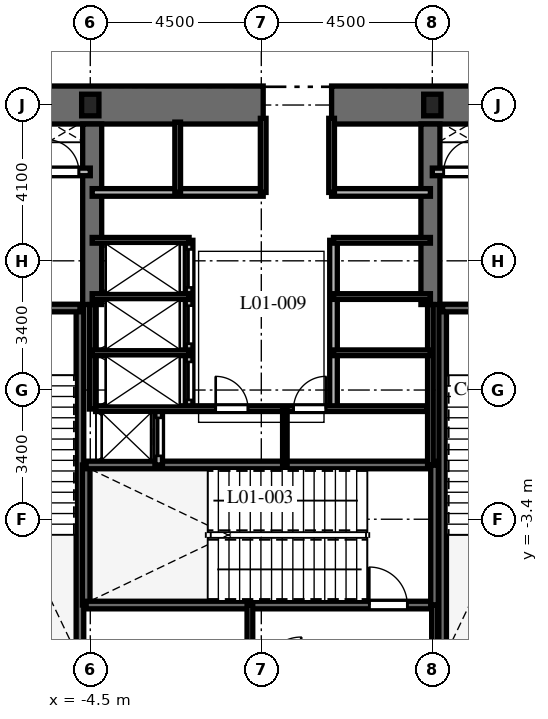
"""IFC4 building model, lengths in metres.
Left out: names, types, materials, properties, quantities, classifications, styles, units other than length and angle.
Written with IfcOpenShell. Run it as: python <this file> out.ifc"""

import sys

from ifc_helpers import new_model, si_unit, direction, frame, frame_2d, origin, origin_2d, place, context, subcontext, project, spatial, rectangle, i_section, extrude, element, fill, save


model = new_model("IFC4")
c1 = context("Model", 3, precision=1e-05, world=origin(), true_north=direction((0.0, 1.0)))
c2 = subcontext(c1, "Body", "Model", "MODEL_VIEW")
j1 = project(units=[si_unit("LENGTHUNIT", "METRE"), si_unit("PLANEANGLEUNIT", "RADIAN")], contexts=[c1])
p1 = place(None, origin())
s1 = spatial("IfcSite", under=j1, at=p1, CompositionType="ELEMENT")
p2 = place(p1, origin())
s2 = spatial("IfcBuilding", under=s1, at=p2, CompositionType="ELEMENT")
p3 = place(p2, frame((0.0, 0.0, 6.0)))
s3 = spatial("IfcBuildingStorey", under=s2, at=p3, CompositionType="ELEMENT", Elevation=6.0)
p4 = place(p3, frame((-9.5, 7.5, 0.0), z_axis=(0.0, 0.0, 1.0), x_axis=(1.0, 0.0, 0.0)))
e1 = element("IfcWall", 1, at=p4, inside=s3, PredefinedType="SHEAR", context=c2, shape_type="SweptSolid", body=[
    extrude(rectangle(XDim=9.55, YDim=1.0, at=frame_2d((4.775, 0.0))), origin(), (0.0, 0.0, 1.0), 5.4),
])
p5 = place(p3, frame((1.85, 7.5, 0.0), z_axis=(0.0, 0.0, 1.0), x_axis=(1.0, 0.0, 0.0)))
e2 = element("IfcWall", 2, at=p5, inside=s3, PredefinedType="SHEAR", context=c2, shape_type="SweptSolid", body=[
    extrude(rectangle(XDim=7.65, YDim=1.0, at=frame_2d((3.825, 0.0))), origin(), (0.0, 0.0, 1.0), 5.4),
])
for number, where, z_axis, x_axis in (
    (3, (-4.45, 2.25, 0.0), (0.0, 0.0, 1.0), (0.0, 1.0, 0.0)),
    (4, (4.45, 2.25, 0.0), (0.0, 0.0, 1.0), (0.0, 1.0, 0.0)),
):
    element("IfcWall", number, at=place(p3, frame(where, z_axis=z_axis, x_axis=x_axis)), inside=s3, PredefinedType="SHEAR", context=c2, shape_type="SweptSolid", body=[
        extrude(rectangle(XDim=4.75, YDim=0.5, at=frame_2d((2.375, 0.0))), origin(), (0.0, 0.0, 1.0), 5.4),
    ])
p6 = place(p3, frame((-4.772, -6.985, 0.0), z_axis=(0.0, 0.0, 1.0), x_axis=(0.0, 1.0, 0.0)))
e5 = element("IfcWall", 5, at=p6, inside=s3, PredefinedType="SHEAR", context=c2, shape_type="SweptSolid", body=[
    extrude(rectangle(XDim=9.143, YDim=0.2, at=frame_2d((4.572, 0.0))), origin(), (0.0, 0.0, 1.0), 5.4),
])
p7 = place(p3, frame((-8.458, 2.158, 0.0), z_axis=(0.0, 0.0, 1.0), x_axis=(1.0, 0.0, 0.0)))
e6 = element("IfcWall", 6, at=p7, inside=s3, PredefinedType="SHEAR", context=c2, shape_type="SweptSolid", body=[
    extrude(rectangle(XDim=3.686, YDim=0.2, at=frame_2d((1.843, 0.0))), origin(), (0.0, 0.0, 1.0), 5.4),
])
p8 = place(p7, frame((1.3, 0.0, 0.0)))
e7 = element("IfcOpeningElement", 7, at=p8, cuts=e6, PredefinedType="OPENING", context=c2, shape_type="SweptSolid", body=[
    extrude(rectangle(XDim=1.0, YDim=2.15, at=frame_2d((0.5, 1.075))), frame((0.0, 0.11, 0.0), z_axis=(0.0, -1.0, 0.0), x_axis=(1.0, 0.0, 0.0)), (0.0, 0.0, 1.0), 0.22),
])
p9 = place(p3, frame((4.772, -6.985, 0.0), z_axis=(0.0, 0.0, 1.0), x_axis=(0.0, 1.0, 0.0)))
e8 = element("IfcWall", 8, at=p9, inside=s3, PredefinedType="SHEAR", context=c2, shape_type="SweptSolid", body=[
    extrude(rectangle(XDim=9.143, YDim=0.2, at=frame_2d((4.572, 0.0))), origin(), (0.0, 0.0, 1.0), 5.4),
])
p10 = place(p3, frame((4.772, 2.158, 0.0), z_axis=(0.0, 0.0, 1.0), x_axis=(1.0, 0.0, 0.0)))
e9 = element("IfcWall", 9, at=p10, inside=s3, PredefinedType="SHEAR", context=c2, shape_type="SweptSolid", body=[
    extrude(rectangle(XDim=3.686, YDim=0.2, at=frame_2d((1.843, 0.0))), origin(), (0.0, 0.0, 1.0), 5.4),
])
p11 = place(p10, frame((1.35, 0.0, 0.0)))
e10 = element("IfcOpeningElement", 10, at=p11, cuts=e9, PredefinedType="OPENING", context=c2, shape_type="SweptSolid", body=[
    extrude(rectangle(XDim=1.0, YDim=2.15, at=frame_2d((0.5, 1.075))), frame((0.0, 0.11, 0.0), z_axis=(0.0, -1.0, 0.0), x_axis=(1.0, 0.0, 0.0)), (0.0, 0.0, 1.0), 0.22),
])
p12 = place(p3, frame((-4.608, -5.658, 0.0), z_axis=(0.0, 0.0, 1.0), x_axis=(0.0, 1.0, 0.0)))
e11 = element("IfcWall", 11, at=p12, inside=s3, PredefinedType="SHEAR", context=c2, shape_type="SweptSolid", body=[
    extrude(rectangle(XDim=3.686, YDim=0.2, at=frame_2d((1.843, 0.0))), origin(), (0.0, 0.0, 1.0), 5.4),
])
p13 = place(p3, frame((-4.608, -5.658, 0.0), z_axis=(0.0, 0.0, 1.0), x_axis=(1.0, 0.0, 0.0)))
e12 = element("IfcWall", 12, at=p13, inside=s3, PredefinedType="SHEAR", context=c2, shape_type="SweptSolid", body=[
    extrude(rectangle(XDim=9.166, YDim=0.2, at=frame_2d((4.583, 0.0))), origin(), (0.0, 0.0, 1.0), 5.4),
])
p14 = place(p13, frame((7.45, 0.0, 0.0)))
e13 = element("IfcOpeningElement", 13, at=p14, cuts=e12, PredefinedType="OPENING", context=c2, shape_type="SweptSolid", body=[
    extrude(rectangle(XDim=1.0, YDim=2.15, at=frame_2d((0.5, 1.075))), frame((0.0, 0.11, 0.0), z_axis=(0.0, -1.0, 0.0), x_axis=(1.0, 0.0, 0.0)), (0.0, 0.0, 1.0), 0.22),
])
p15 = place(p3, frame((-4.608, -1.972, 0.0), z_axis=(0.0, 0.0, 1.0), x_axis=(1.0, 0.0, 0.0)))
e14 = element("IfcWall", 14, at=p15, inside=s3, PredefinedType="SHEAR", context=c2, shape_type="SweptSolid", body=[
    extrude(rectangle(XDim=9.166, YDim=0.2, at=frame_2d((4.583, 0.0))), origin(), (0.0, 0.0, 1.0), 5.4),
])
p16 = place(p3, frame((4.558, -5.658, 0.0), z_axis=(0.0, 0.0, 1.0), x_axis=(0.0, 1.0, 0.0)))
e15 = element("IfcWall", 15, at=p16, inside=s3, PredefinedType="SHEAR", context=c2, shape_type="SweptSolid", body=[
    extrude(rectangle(XDim=3.686, YDim=0.2, at=frame_2d((1.843, 0.0))), origin(), (0.0, 0.0, 1.0), 5.4),
])
for number, where, z_axis, x_axis in (
    (16, (4.5, 7.5, 0.0), (0.0, 0.0, 1.0), (1.0, 0.0, 0.0)),
    (17, (-4.5, 7.5, 0.0), (0.0, 0.0, 1.0), (1.0, 0.0, 0.0)),
):
    element("IfcColumn", number, at=place(p3, frame(where, z_axis=z_axis, x_axis=x_axis)), inside=s3, PredefinedType="COLUMN", context=c2, shape_type="SweptSolid", body=[
        extrude(i_section(OverallWidth=0.454, OverallDepth=0.569, WebThickness=0.078, FlangeThickness=0.125, at=origin_2d()), origin(), (0.0, 0.0, 1.0), 5.4),
    ])
for number, where, z_axis, x_axis in (
    (18, (-0.3, -7.02, 0.0), (0.0, 0.0, 1.0), (0.0, 1.0, 0.0)),
    (19, (4.558, -7.02, 0.0), (0.0, 0.0, 1.0), (0.0, 1.0, 0.0)),
):
    element("IfcWall", number, at=place(p3, frame(where, z_axis=z_axis, x_axis=x_axis)), inside=s3, PredefinedType="PARTITIONING", context=c2, shape_type="SweptSolid", body=[
        extrude(rectangle(XDim=1.362, YDim=0.15, at=frame_2d((0.681, 0.0))), origin(), (0.0, 0.0, 1.0), 5.08),
    ])
p17 = place(p3, frame((-8.55, 5.74, 0.0), z_axis=(0.0, 0.0, 1.0), x_axis=(1.0, 0.0, 0.0)))
e20 = element("IfcWall", 20, at=p17, inside=s3, PredefinedType="PARTITIONING", context=c2, shape_type="SweptSolid", body=[
    extrude(rectangle(XDim=4.05, YDim=0.2, at=frame_2d((2.025, 0.0))), origin(), (0.0, 0.0, 1.0), 5.08),
])
p18 = place(p17, frame((0.75, 0.0, 0.0)))
e21 = element("IfcOpeningElement", 21, at=p18, cuts=e20, PredefinedType="OPENING", context=c2, shape_type="SweptSolid", body=[
    extrude(rectangle(XDim=1.1, YDim=2.2, at=frame_2d((0.55, 1.1))), frame((0.0, 0.11, 0.0), z_axis=(0.0, -1.0, 0.0), x_axis=(1.0, 0.0, 0.0)), (0.0, 0.0, 1.0), 0.22),
])
p19 = place(p17, frame((2.9, 0.0, 0.0)))
e22 = element("IfcOpeningElement", 22, at=p19, cuts=e20, PredefinedType="OPENING", context=c2, shape_type="SweptSolid", body=[
    extrude(rectangle(XDim=0.85, YDim=2.03, at=frame_2d((0.425, 1.015))), frame((0.0, 0.11, 0.0), z_axis=(0.0, -1.0, 0.0), x_axis=(1.0, 0.0, 0.0)), (0.0, 0.0, 1.0), 0.22),
])
p20 = place(p3, frame((4.5, 5.74, 0.0), z_axis=(0.0, 0.0, 1.0), x_axis=(1.0, 0.0, 0.0)))
e23 = element("IfcWall", 23, at=p20, inside=s3, PredefinedType="PARTITIONING", context=c2, shape_type="SweptSolid", body=[
    extrude(rectangle(XDim=4.05, YDim=0.2, at=frame_2d((2.025, 0.0))), origin(), (0.0, 0.0, 1.0), 5.08),
])
p21 = place(p20, frame((0.3, 0.0, 0.0)))
e24 = element("IfcOpeningElement", 24, at=p21, cuts=e23, PredefinedType="OPENING", context=c2, shape_type="SweptSolid", body=[
    extrude(rectangle(XDim=0.85, YDim=2.03, at=frame_2d((0.425, 1.015))), frame((0.0, 0.11, 0.0), z_axis=(0.0, -1.0, 0.0), x_axis=(1.0, 0.0, 0.0)), (0.0, 0.0, 1.0), 0.22),
])
p22 = place(p20, frame((2.15, 0.0, 0.0)))
e25 = element("IfcOpeningElement", 25, at=p22, cuts=e23, PredefinedType="OPENING", context=c2, shape_type="SweptSolid", body=[
    extrude(rectangle(XDim=1.1, YDim=2.2, at=frame_2d((0.55, 1.1))), frame((0.0, 0.11, 0.0), z_axis=(0.0, -1.0, 0.0), x_axis=(1.0, 0.0, 0.0)), (0.0, 0.0, 1.0), 0.22),
])
p23 = place(p3, frame((-2.7, -1.972, 0.0), z_axis=(0.0, 0.0, 1.0), x_axis=(0.0, 1.0, 0.0)))
e26 = element("IfcWall", 26, at=p23, inside=s3, PredefinedType="PARTITIONING", context=c2, shape_type="SweptSolid", body=[
    extrude(rectangle(XDim=1.472, YDim=0.2, at=frame_2d((0.736, 0.0))), origin(), (0.0, 0.0, 1.0), 5.08),
])
p24 = place(p23, frame((0.24, 0.0, 0.0)))
e27 = element("IfcOpeningElement", 27, at=p24, cuts=e26, PredefinedType="OPENING", context=c2, shape_type="SweptSolid", body=[
    extrude(rectangle(XDim=1.0, YDim=2.2, at=frame_2d((0.5, 1.1))), frame((0.0, 0.11, 0.0), z_axis=(0.0, -1.0, 0.0), x_axis=(1.0, 0.0, 0.0)), (0.0, 0.0, 1.0), 0.22),
])
p25 = place(p3, frame((-4.45, 5.2, 0.0), z_axis=(0.0, 0.0, 1.0), x_axis=(1.0, 0.0, 0.0)))
e28 = element("IfcWall", 28, at=p25, inside=s3, PredefinedType="PARTITIONING", context=c2, shape_type="SweptSolid", body=[
    extrude(rectangle(XDim=4.5, YDim=0.2, at=frame_2d((2.25, 0.0))), origin(), (0.0, 0.0, 1.0), 5.08),
])
p26 = place(p3, frame((1.85, 5.2, 0.0), z_axis=(0.0, 0.0, 1.0), x_axis=(1.0, 0.0, 0.0)))
e29 = element("IfcWall", 29, at=p26, inside=s3, PredefinedType="PARTITIONING", context=c2, shape_type="SweptSolid", body=[
    extrude(rectangle(XDim=2.6, YDim=0.2, at=frame_2d((1.3, 0.0))), origin(), (0.0, 0.0, 1.0), 5.08),
])
p27 = place(p3, frame((-2.2, 5.2, 0.0), z_axis=(0.0, 0.0, 1.0), x_axis=(0.0, 1.0, 0.0)))
e30 = element("IfcWall", 30, at=p27, inside=s3, PredefinedType="PARTITIONING", context=c2, shape_type="SweptSolid", body=[
    extrude(rectangle(XDim=1.85, YDim=0.15, at=frame_2d((0.925, 0.0))), origin(), (0.0, 0.0, 1.0), 5.08),
])
for number, where, z_axis, x_axis in (
    (31, (0.05, 5.2, 0.0), (0.0, 0.0, 1.0), (0.0, 1.0, 0.0)),
    (32, (1.85, 5.2, 0.0), (0.0, 0.0, 1.0), (0.0, 1.0, 0.0)),
):
    element("IfcWall", number, at=place(p3, frame(where, z_axis=z_axis, x_axis=x_axis)), inside=s3, PredefinedType="PARTITIONING", context=c2, shape_type="SweptSolid", body=[
        extrude(rectangle(XDim=1.95, YDim=0.15, at=frame_2d((0.975, 0.0))), origin(), (0.0, 0.0, 1.0), 5.08),
    ])
p28 = place(p3, frame((-4.45, -0.5, 0.0), z_axis=(0.0, 0.0, 1.0), x_axis=(0.0, 1.0, 0.0)))
e33 = element("IfcWall", 33, at=p28, inside=s3, PredefinedType="PARTITIONING", context=c2, shape_type="SweptSolid", body=[
    extrude(rectangle(XDim=2.75, YDim=0.15, at=frame_2d((1.375, 0.0))), origin(), (0.0, 0.0, 1.0), 5.08),
])
p29 = place(p3, frame((4.45, -1.972, 0.0), z_axis=(0.0, 0.0, 1.0), x_axis=(0.0, 1.0, 0.0)))
e34 = element("IfcWall", 34, at=p29, inside=s3, PredefinedType="PARTITIONING", context=c2, shape_type="SweptSolid", body=[
    extrude(rectangle(XDim=4.222, YDim=0.15, at=frame_2d((2.111, 0.0))), origin(), (0.0, 0.0, 1.0), 5.08),
])
p30 = place(p3, frame((-1.9, -0.5, 0.0), z_axis=(0.0, 0.0, 1.0), x_axis=(0.0, 1.0, 0.0)))
e35 = element("IfcWall", 35, at=p30, inside=s3, PredefinedType="PARTITIONING", context=c2, shape_type="SweptSolid", body=[
    extrude(rectangle(XDim=4.44, YDim=0.2, at=frame_2d((2.22, 0.0))), origin(), (0.0, 0.0, 1.0), 5.08),
])
p31 = place(p30, frame((0.24, 0.0, 0.0)))
e36 = element("IfcOpeningElement", 36, at=p31, cuts=e35, PredefinedType="OPENING", context=c2, shape_type="SweptSolid", body=[
    extrude(rectangle(XDim=1.0, YDim=2.2, at=frame_2d((0.5, 1.1))), frame((0.0, 0.11, 0.0), z_axis=(0.0, -1.0, 0.0), x_axis=(1.0, 0.0, 0.0)), (0.0, 0.0, 1.0), 0.22),
])
p32 = place(p30, frame((1.72, 0.0, 0.0)))
e37 = element("IfcOpeningElement", 37, at=p32, cuts=e35, PredefinedType="OPENING", context=c2, shape_type="SweptSolid", body=[
    extrude(rectangle(XDim=1.0, YDim=2.2, at=frame_2d((0.5, 1.1))), frame((0.0, 0.11, 0.0), z_axis=(0.0, -1.0, 0.0), x_axis=(1.0, 0.0, 0.0)), (0.0, 0.0, 1.0), 0.22),
])
p33 = place(p30, frame((3.2, 0.0, 0.0)))
e38 = element("IfcOpeningElement", 38, at=p33, cuts=e35, PredefinedType="OPENING", context=c2, shape_type="SweptSolid", body=[
    extrude(rectangle(XDim=1.0, YDim=2.2, at=frame_2d((0.5, 1.1))), frame((0.0, 0.11, 0.0), z_axis=(0.0, -1.0, 0.0), x_axis=(1.0, 0.0, 0.0)), (0.0, 0.0, 1.0), 0.22),
])
for number, where, z_axis, x_axis in (
    (39, (-4.45, 3.94, 0.0), (0.0, 0.0, 1.0), (1.0, 0.0, 0.0)),
    (40, (-4.45, 0.98, 0.0), (0.0, 0.0, 1.0), (1.0, 0.0, 0.0)),
    (41, (-4.45, 2.46, 0.0), (0.0, 0.0, 1.0), (1.0, 0.0, 0.0)),
):
    element("IfcWall", number, at=place(p3, frame(where, z_axis=z_axis, x_axis=x_axis)), inside=s3, PredefinedType="PARTITIONING", context=c2, shape_type="SweptSolid", body=[
        extrude(rectangle(XDim=2.55, YDim=0.15, at=frame_2d((1.275, 0.0))), origin(), (0.0, 0.0, 1.0), 5.08),
    ])
p34 = place(p3, frame((1.9, -0.5, 0.0), z_axis=(0.0, 0.0, 1.0), x_axis=(0.0, 1.0, 0.0)))
e42 = element("IfcWall", 42, at=p34, inside=s3, PredefinedType="PARTITIONING", context=c2, shape_type="SweptSolid", body=[
    extrude(rectangle(XDim=4.44, YDim=0.2, at=frame_2d((2.22, 0.0))), origin(), (0.0, 0.0, 1.0), 5.08),
])
for number, where, z_axis, x_axis in (
    (43, (1.9, 3.94, 0.0), (0.0, 0.0, 1.0), (1.0, 0.0, 0.0)),
    (44, (1.9, 0.98, 0.0), (0.0, 0.0, 1.0), (1.0, 0.0, 0.0)),
    (45, (1.9, 2.46, 0.0), (0.0, 0.0, 1.0), (1.0, 0.0, 0.0)),
):
    element("IfcWall", number, at=place(p3, frame(where, z_axis=z_axis, x_axis=x_axis)), inside=s3, PredefinedType="PARTITIONING", context=c2, shape_type="SweptSolid", body=[
        extrude(rectangle(XDim=2.55, YDim=0.15, at=frame_2d((1.275, 0.0))), origin(), (0.0, 0.0, 1.0), 5.08),
    ])
p35 = place(p3, frame((-4.36, -0.49, 0.0), z_axis=(0.0, 0.0, 1.0), x_axis=(1.0, 0.0, 0.0)))
e46 = element("IfcWall", 46, at=p35, inside=s3, PredefinedType="PARTITIONING", context=c2, shape_type="SweptSolid", body=[
    extrude(rectangle(XDim=8.72, YDim=0.15, at=frame_2d((4.36, 0.0))), origin(), (0.0, 0.0, 1.0), 5.08),
])
p36 = place(p35, frame((3.16, 0.0, 0.0)))
e47 = element("IfcOpeningElement", 47, at=p36, cuts=e46, PredefinedType="OPENING", context=c2, shape_type="SweptSolid", body=[
    extrude(rectangle(XDim=0.85, YDim=2.03, at=frame_2d((0.425, 1.015))), frame((0.0, 0.085, 0.0), z_axis=(0.0, -1.0, 0.0), x_axis=(1.0, 0.0, 0.0)), (0.0, 0.0, 1.0), 0.17),
])
p37 = place(p35, frame((5.21, 0.0, 0.0)))
e48 = element("IfcOpeningElement", 48, at=p37, cuts=e46, PredefinedType="OPENING", context=c2, shape_type="SweptSolid", body=[
    extrude(rectangle(XDim=0.85, YDim=2.03, at=frame_2d((0.425, 1.015))), frame((0.0, 0.085, 0.0), z_axis=(0.0, -1.0, 0.0), x_axis=(1.0, 0.0, 0.0)), (0.0, 0.0, 1.0), 0.17),
])
p38 = place(p3, frame((0.62, -1.972, 0.0), z_axis=(0.0, 0.0, 1.0), x_axis=(0.0, 1.0, 0.0)))
e49 = element("IfcWall", 49, at=p38, inside=s3, PredefinedType="PARTITIONING", context=c2, shape_type="SweptSolid", body=[
    extrude(rectangle(XDim=1.472, YDim=0.12, at=frame_2d((0.736, 0.0))), origin(), (0.0, 0.0, 1.0), 5.08),
])
p39 = place(p14, origin())
e50 = element("IfcDoor", 50, at=p39, inside=s3, OperationType="SINGLE_SWING_LEFT", PredefinedType="DOOR", context=c2, shape_type="SweptSolid", body=[
    extrude(rectangle(XDim=1.0, YDim=2.15, at=frame_2d((0.5, 1.075))), frame((0.0, 0.025, 0.0), z_axis=(0.0, -1.0, 0.0), x_axis=(1.0, 0.0, 0.0)), (0.0, 0.0, 1.0), 0.05),
])
fill(e13, e50)
p40 = place(p19, origin())
e51 = element("IfcDoor", 51, at=p40, inside=s3, OperationType="SINGLE_SWING_LEFT", PredefinedType="DOOR", context=c2, shape_type="SweptSolid", body=[
    extrude(rectangle(XDim=0.85, YDim=2.03, at=frame_2d((0.425, 1.015))), frame((0.0, 0.025, 0.0), z_axis=(0.0, -1.0, 0.0), x_axis=(1.0, 0.0, 0.0)), (0.0, 0.0, 1.0), 0.05),
])
fill(e22, e51)
p41 = place(p21, origin())
e52 = element("IfcDoor", 52, at=p41, inside=s3, OperationType="SINGLE_SWING_RIGHT", PredefinedType="DOOR", context=c2, shape_type="SweptSolid", body=[
    extrude(rectangle(XDim=0.85, YDim=2.03, at=frame_2d((0.425, 1.015))), frame((0.0, 0.025, 0.0), z_axis=(0.0, -1.0, 0.0), x_axis=(1.0, 0.0, 0.0)), (0.0, 0.0, 1.0), 0.05),
])
fill(e24, e52)
p42 = place(p24, origin())
e53 = element("IfcDoor", 53, at=p42, inside=s3, OperationType="SLIDING_TO_LEFT", PredefinedType="DOOR", context=c2, shape_type="SweptSolid", body=[
    extrude(rectangle(XDim=1.0, YDim=2.2, at=frame_2d((0.5, 1.1))), frame((0.0, 0.025, 0.0), z_axis=(0.0, -1.0, 0.0), x_axis=(1.0, 0.0, 0.0)), (0.0, 0.0, 1.0), 0.05),
])
fill(e27, e53)
p43 = place(p31, origin())
e54 = element("IfcDoor", 54, at=p43, inside=s3, OperationType="SLIDING_TO_LEFT", PredefinedType="DOOR", context=c2, shape_type="SweptSolid", body=[
    extrude(rectangle(XDim=1.0, YDim=2.2, at=frame_2d((0.5, 1.1))), frame((0.0, 0.025, 0.0), z_axis=(0.0, -1.0, 0.0), x_axis=(1.0, 0.0, 0.0)), (0.0, 0.0, 1.0), 0.05),
])
fill(e36, e54)
p44 = place(p32, origin())
e55 = element("IfcDoor", 55, at=p44, inside=s3, OperationType="SLIDING_TO_LEFT", PredefinedType="DOOR", context=c2, shape_type="SweptSolid", body=[
    extrude(rectangle(XDim=1.0, YDim=2.2, at=frame_2d((0.5, 1.1))), frame((0.0, 0.025, 0.0), z_axis=(0.0, -1.0, 0.0), x_axis=(1.0, 0.0, 0.0)), (0.0, 0.0, 1.0), 0.05),
])
fill(e37, e55)
p45 = place(p33, origin())
e56 = element("IfcDoor", 56, at=p45, inside=s3, OperationType="SLIDING_TO_LEFT", PredefinedType="DOOR", context=c2, shape_type="SweptSolid", body=[
    extrude(rectangle(XDim=1.0, YDim=2.2, at=frame_2d((0.5, 1.1))), frame((0.0, 0.025, 0.0), z_axis=(0.0, -1.0, 0.0), x_axis=(1.0, 0.0, 0.0)), (0.0, 0.0, 1.0), 0.05),
])
fill(e38, e56)
p46 = place(p36, origin())
e57 = element("IfcDoor", 57, at=p46, inside=s3, OperationType="SINGLE_SWING_LEFT", PredefinedType="DOOR", context=c2, shape_type="SweptSolid", body=[
    extrude(rectangle(XDim=0.85, YDim=2.03, at=frame_2d((0.425, 1.015))), frame((0.0, 0.025, 0.0), z_axis=(0.0, -1.0, 0.0), x_axis=(1.0, 0.0, 0.0)), (0.0, 0.0, 1.0), 0.05),
])
fill(e47, e57)
p47 = place(p37, origin())
e58 = element("IfcDoor", 58, at=p47, inside=s3, OperationType="SINGLE_SWING_RIGHT", PredefinedType="DOOR", context=c2, shape_type="SweptSolid", body=[
    extrude(rectangle(XDim=0.85, YDim=2.03, at=frame_2d((0.425, 1.015))), frame((0.0, 0.025, 0.0), z_axis=(0.0, -1.0, 0.0), x_axis=(1.0, 0.0, 0.0)), (0.0, 0.0, 1.0), 0.05),
])
fill(e48, e58)
save(model, sys.argv[1])
